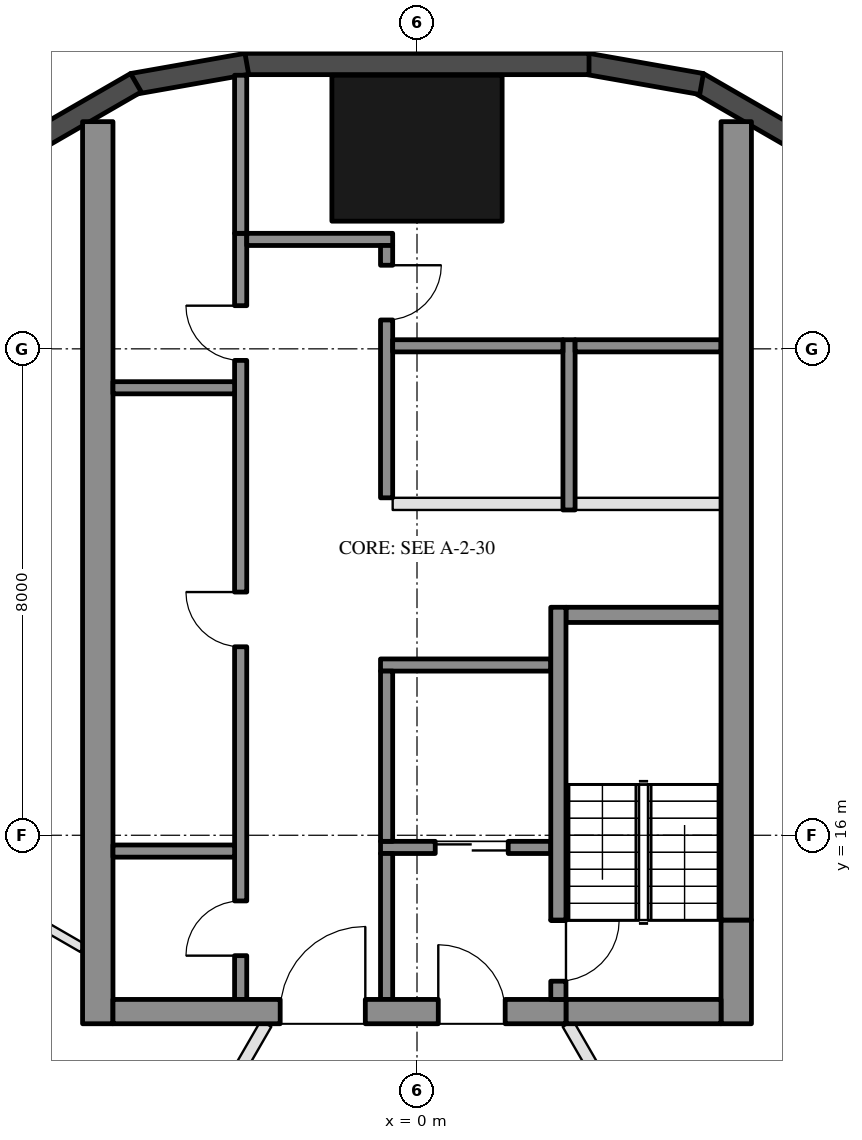
"""IFC4 building model, lengths in metres.
Left out: names, types, materials, properties, quantities, classifications, styles, units other than length and angle.
Written with IfcOpenShell. Run it as: python <this file> out.ifc"""

import sys

from ifc_helpers import new_model, si_unit, direction, frame, frame_2d, origin, origin_2d, place, context, subcontext, project, spatial, rectangle, hollow_rectangle, extrude, element, fill, save


model = new_model("IFC4")
c1 = context("Model", 3, precision=1e-05, world=origin(), true_north=direction((0.0, 1.0)))
c2 = subcontext(c1, "Body", "Model", "MODEL_VIEW")
j1 = project(units=[si_unit("LENGTHUNIT", "METRE"), si_unit("PLANEANGLEUNIT", "RADIAN")], contexts=[c1])
p1 = place(None, origin())
s1 = spatial("IfcSite", under=j1, at=p1, CompositionType="ELEMENT")
p2 = place(p1, origin())
s2 = spatial("IfcBuilding", under=s1, at=p2, CompositionType="ELEMENT")
p3 = place(p2, frame((0.0, 0.0, 131.6)))
s3 = spatial("IfcBuildingStorey", under=s2, at=p3, CompositionType="ELEMENT", Elevation=131.6)
p4 = place(p3, frame((0.0, 27.3, 0.0), z_axis=(0.0, 0.0, 1.0), x_axis=(1.0, 0.0, 0.0)))
e1 = element("IfcColumn", 1, at=p4, inside=s3, PredefinedType="COLUMN", context=c2, shape_type="SweptSolid", body=[
    extrude(hollow_rectangle(XDim=2.8, YDim=2.4, WallThickness=0.07, at=origin_2d()), origin(), (0.0, 0.0, 1.0), 6.0),
])
for number, where, z_axis, x_axis in (
    (2, (6.277, 27.422, 0.0), (0.0, 0.0, 1.0), (-0.866, 0.5, 0.0)),
    (3, (4.68, 28.356, 0.0), (0.0, 0.0, 1.0), (-0.985, 0.174, 0.0)),
):
    element("IfcWall", number, at=place(p3, frame(where, z_axis=z_axis, x_axis=x_axis)), inside=s3, PredefinedType="SOLIDWALL", context=c2, shape_type="SweptSolid", body=[
        extrude(rectangle(XDim=1.91, YDim=0.35, at=frame_2d((0.955, 0.0))), origin(), (0.0, 0.0, 1.0), 5.7),
    ])
p5 = place(p3, frame((2.829, 28.685, 0.0), z_axis=(0.0, 0.0, 1.0), x_axis=(-1.0, 0.0, 0.0)))
e4 = element("IfcWall", 4, at=p5, inside=s3, PredefinedType="SOLIDWALL", context=c2, shape_type="SweptSolid", body=[
    extrude(rectangle(XDim=5.658, YDim=0.35, at=frame_2d((2.829, 0.0))), origin(), (0.0, 0.0, 1.0), 5.7),
])
for number, where, z_axis, x_axis in (
    (5, (-2.799, 28.688, 0.0), (0.0, 0.0, 1.0), (-0.985, -0.174, 0.0)),
    (6, (-4.623, 28.377, 0.0), (0.0, 0.0, 1.0), (-0.866, -0.5, 0.0)),
):
    element("IfcWall", number, at=place(p3, frame(where, z_axis=z_axis, x_axis=x_axis)), inside=s3, PredefinedType="SOLIDWALL", context=c2, shape_type="SweptSolid", body=[
        extrude(rectangle(XDim=1.91, YDim=0.35, at=frame_2d((0.955, 0.0))), origin(), (0.0, 0.0, 1.0), 5.7),
    ])
p6 = place(p3, frame((-5.25, 12.9, 0.0), z_axis=(0.0, 0.0, 1.0), x_axis=(0.0, 1.0, 0.0)))
e7 = element("IfcWall", 7, at=p6, inside=s3, PredefinedType="SHEAR", context=c2, shape_type="SweptSolid", body=[
    extrude(rectangle(XDim=14.837, YDim=0.5, at=frame_2d((7.418, 0.0))), origin(), (0.0, 0.0, 1.0), 5.7),
])
p7 = place(p3, frame((5.0, 19.625, 0.0), z_axis=(0.0, 0.0, 1.0), x_axis=(-1.0, 0.0, 0.0)))
e8 = element("IfcWall", 8, at=p7, inside=s3, PredefinedType="SHEAR", context=c2, shape_type="SweptSolid", body=[
    extrude(rectangle(XDim=2.55, YDim=0.25, at=frame_2d((1.275, 0.0))), origin(), (0.0, 0.0, 1.0), 5.7),
])
p8 = place(p3, frame((2.2, 18.8, 0.0), z_axis=(0.0, 0.0, 1.0), x_axis=(-1.0, 0.0, 0.0)))
e9 = element("IfcWall", 9, at=p8, inside=s3, PredefinedType="SHEAR", context=c2, shape_type="SweptSolid", body=[
    extrude(rectangle(XDim=2.8, YDim=0.2, at=frame_2d((1.4, 0.0))), origin(), (0.0, 0.0, 1.0), 5.7),
])
p9 = place(p3, frame((2.2, 15.8, 0.0), z_axis=(0.0, 0.0, 1.0), x_axis=(-1.0, 0.0, 0.0)))
e10 = element("IfcWall", 10, at=p9, inside=s3, PredefinedType="SHEAR", context=c2, shape_type="SweptSolid", body=[
    extrude(rectangle(XDim=2.8, YDim=0.2, at=frame_2d((1.4, 0.0))), origin(), (0.0, 0.0, 1.0), 5.7),
])
p10 = place(p9, frame((0.7, 0.0, 0.0)))
e11 = element("IfcOpeningElement", 11, at=p10, cuts=e10, PredefinedType="OPENING", context=c2, shape_type="SweptSolid", body=[
    extrude(rectangle(XDim=1.2, YDim=2.1, at=frame_2d((0.6, 1.05))), frame((0.0, 0.11, 0.0), z_axis=(0.0, -1.0, 0.0), x_axis=(1.0, 0.0, 0.0)), (0.0, 0.0, 1.0), 0.22),
])
p11 = place(p3, frame((-0.5, 15.9, 0.0), z_axis=(0.0, 0.0, 1.0), x_axis=(0.0, 1.0, 0.0)))
e12 = element("IfcWall", 12, at=p11, inside=s3, PredefinedType="SHEAR", context=c2, shape_type="SweptSolid", body=[
    extrude(rectangle(XDim=2.8, YDim=0.2, at=frame_2d((1.4, 0.0))), origin(), (0.0, 0.0, 1.0), 5.7),
])
p12 = place(p3, frame((-0.5, 13.3, 0.0), z_axis=(0.0, 0.0, 1.0), x_axis=(0.0, 1.0, 0.0)))
e13 = element("IfcWall", 13, at=p12, inside=s3, PredefinedType="SHEAR", context=c2, shape_type="SweptSolid", body=[
    extrude(rectangle(XDim=2.4, YDim=0.2, at=frame_2d((1.2, 0.0))), origin(), (0.0, 0.0, 1.0), 5.7),
])
p13 = place(p3, frame((-2.9, 13.3, 0.0), z_axis=(0.0, 0.0, 1.0), x_axis=(0.0, 1.0, 0.0)))
e14 = element("IfcWall", 14, at=p13, inside=s3, PredefinedType="SHEAR", context=c2, shape_type="SweptSolid", body=[
    extrude(rectangle(XDim=12.6, YDim=0.2, at=frame_2d((6.3, 0.0))), origin(), (0.0, 0.0, 1.0), 5.7),
])
p14 = place(p13, frame((0.72, 0.0, 0.0)))
e15 = element("IfcOpeningElement", 15, at=p14, cuts=e14, PredefinedType="OPENING", context=c2, shape_type="SweptSolid", body=[
    extrude(rectangle(XDim=0.9, YDim=2.1, at=frame_2d((0.45, 1.05))), frame((0.0, 0.11, 0.0), z_axis=(0.0, -1.0, 0.0), x_axis=(1.0, 0.0, 0.0)), (0.0, 0.0, 1.0), 0.22),
])
p15 = place(p13, frame((5.8, 0.0, 0.0)))
e16 = element("IfcOpeningElement", 16, at=p15, cuts=e14, PredefinedType="OPENING", context=c2, shape_type="SweptSolid", body=[
    extrude(rectangle(XDim=0.9, YDim=2.1, at=frame_2d((0.45, 1.05))), frame((0.0, 0.11, 0.0), z_axis=(0.0, -1.0, 0.0), x_axis=(1.0, 0.0, 0.0)), (0.0, 0.0, 1.0), 0.22),
])
p16 = place(p13, frame((10.51, 0.0, 0.0)))
e17 = element("IfcOpeningElement", 17, at=p16, cuts=e14, PredefinedType="OPENING", context=c2, shape_type="SweptSolid", body=[
    extrude(rectangle(XDim=0.9, YDim=2.1, at=frame_2d((0.45, 1.05))), frame((0.0, 0.11, 0.0), z_axis=(0.0, -1.0, 0.0), x_axis=(1.0, 0.0, 0.0)), (0.0, 0.0, 1.0), 0.22),
])
p17 = place(p3, frame((-0.4, 25.8, 0.0), z_axis=(0.0, 0.0, 1.0), x_axis=(-1.0, 0.0, 0.0)))
e18 = element("IfcWall", 18, at=p17, inside=s3, PredefinedType="SHEAR", context=c2, shape_type="SweptSolid", body=[
    extrude(rectangle(XDim=2.4, YDim=0.2, at=frame_2d((1.2, 0.0))), origin(), (0.0, 0.0, 1.0), 5.7),
])
p18 = place(p3, frame((-0.5, 21.55, 0.0), z_axis=(0.0, 0.0, 1.0), x_axis=(0.0, 1.0, 0.0)))
e19 = element("IfcWall", 19, at=p18, inside=s3, PredefinedType="SHEAR", context=c2, shape_type="SweptSolid", body=[
    extrude(rectangle(XDim=4.15, YDim=0.2, at=frame_2d((2.075, 0.0))), origin(), (0.0, 0.0, 1.0), 5.7),
])
p19 = place(p18, frame((2.925, 0.0, 0.0)))
e20 = element("IfcOpeningElement", 20, at=p19, cuts=e19, PredefinedType="OPENING", context=c2, shape_type="SweptSolid", body=[
    extrude(rectangle(XDim=0.9, YDim=2.1, at=frame_2d((0.45, 1.05))), frame((0.0, 0.11, 0.0), z_axis=(0.0, -1.0, 0.0), x_axis=(1.0, 0.0, 0.0)), (0.0, 0.0, 1.0), 0.22),
])
for number, where, z_axis, x_axis in (
    (21, (-3.0, 15.74, 0.0), (0.0, 0.0, 1.0), (-1.0, 0.0, 0.0)),
    (22, (-3.0, 23.36, 0.0), (0.0, 0.0, 1.0), (-1.0, 0.0, 0.0)),
):
    element("IfcWall", number, at=place(p3, frame(where, z_axis=z_axis, x_axis=x_axis)), inside=s3, PredefinedType="SHEAR", context=c2, shape_type="SweptSolid", body=[
        extrude(rectangle(XDim=2.0, YDim=0.2, at=frame_2d((1.0, 0.0))), origin(), (0.0, 0.0, 1.0), 5.7),
    ])
p20 = place(p3, frame((-2.9, 25.9, 0.0), z_axis=(0.0, 0.0, 1.0), x_axis=(0.0, 1.0, 0.0)))
e23 = element("IfcWall", 23, at=p20, inside=s3, PredefinedType="SHEAR", context=c2, shape_type="SweptSolid", body=[
    extrude(rectangle(XDim=2.6, YDim=0.2, at=frame_2d((1.3, 0.0))), origin(), (0.0, 0.0, 1.0), 5.7),
])
p21 = place(p3, frame((2.5, 21.35, 0.0), z_axis=(0.0, 0.0, 1.0), x_axis=(0.0, 1.0, 0.0)))
e24 = element("IfcWall", 24, at=p21, inside=s3, PredefinedType="SHEAR", context=c2, shape_type="SweptSolid", body=[
    extrude(rectangle(XDim=2.8, YDim=0.2, at=frame_2d((1.4, 0.0))), origin(), (0.0, 0.0, 1.0), 5.7),
])
p22 = place(p3, frame((5.0, 24.05, 0.0), z_axis=(0.0, 0.0, 1.0), x_axis=(-1.0, 0.0, 0.0)))
e25 = element("IfcWall", 25, at=p22, inside=s3, PredefinedType="SHEAR", context=c2, shape_type="SweptSolid", body=[
    extrude(rectangle(XDim=2.4, YDim=0.2, at=frame_2d((1.2, 0.0))), origin(), (0.0, 0.0, 1.0), 5.7),
])
p23 = place(p3, frame((2.4, 24.05, 0.0), z_axis=(0.0, 0.0, 1.0), x_axis=(-1.0, 0.0, 0.0)))
e26 = element("IfcWall", 26, at=p23, inside=s3, PredefinedType="SHEAR", context=c2, shape_type="SweptSolid", body=[
    extrude(rectangle(XDim=2.8, YDim=0.2, at=frame_2d((1.4, 0.0))), origin(), (0.0, 0.0, 1.0), 5.7),
])
p24 = place(p3, frame((5.0, 21.45, 0.0), z_axis=(0.0, 0.0, 1.0), x_axis=(-1.0, 0.0, 0.0)))
e27 = element("IfcWall", 27, at=p24, inside=s3, PredefinedType="PARTITIONING", context=c2, shape_type="SweptSolid", body=[
    extrude(rectangle(XDim=2.4, YDim=0.2, at=frame_2d((1.2, 0.0))), origin(), (0.0, 0.0, 1.0), 5.7),
])
p25 = place(p3, frame((2.4, 21.45, 0.0), z_axis=(0.0, 0.0, 1.0), x_axis=(-1.0, 0.0, 0.0)))
e28 = element("IfcWall", 28, at=p25, inside=s3, PredefinedType="PARTITIONING", context=c2, shape_type="SweptSolid", body=[
    extrude(rectangle(XDim=2.8, YDim=0.2, at=frame_2d((1.4, 0.0))), origin(), (0.0, 0.0, 1.0), 5.7),
])
p26 = place(p3, frame((5.25, 12.9, 0.0), z_axis=(0.0, 0.0, 1.0), x_axis=(0.0, 1.0, 0.0)))
e29 = element("IfcWall", 29, at=p26, inside=s3, PredefinedType="SHEAR", context=c2, shape_type="SweptSolid", body=[
    extrude(rectangle(XDim=1.706, YDim=0.5, at=frame_2d((0.853, 0.0))), origin(), (0.0, 0.0, 1.0), 5.7),
])
p27 = place(p3, frame((5.25, 14.606, 0.0), z_axis=(0.0, 0.0, 1.0), x_axis=(0.0, 1.0, 0.0)))
e30 = element("IfcWall", 30, at=p27, inside=s3, PredefinedType="SHEAR", context=c2, shape_type="SweptSolid", body=[
    extrude(rectangle(XDim=13.131, YDim=0.5, at=frame_2d((6.565, 0.0))), origin(), (0.0, 0.0, 1.0), 5.7),
])
p28 = place(p3, frame((5.0, 13.1, 0.0), z_axis=(0.0, 0.0, 1.0), x_axis=(-1.0, 0.0, 0.0)))
e31 = element("IfcWall", 31, at=p28, inside=s3, PredefinedType="SHEAR", context=c2, shape_type="SweptSolid", body=[
    extrude(rectangle(XDim=2.55, YDim=0.4, at=frame_2d((1.275, 0.0))), origin(), (0.0, 0.0, 1.0), 5.7),
])
p29 = place(p3, frame((2.45, 13.1, 0.0), z_axis=(0.0, 0.0, 1.0), x_axis=(-1.0, 0.0, 0.0)))
e32 = element("IfcWall", 32, at=p29, inside=s3, PredefinedType="SHEAR", context=c2, shape_type="SweptSolid", body=[
    extrude(rectangle(XDim=7.45, YDim=0.4, at=frame_2d((3.725, 0.0))), origin(), (0.0, 0.0, 1.0), 5.7),
])
p30 = place(p29, frame((1.0, 0.0, 0.0)))
e33 = element("IfcOpeningElement", 33, at=p30, cuts=e32, PredefinedType="OPENING", context=c2, shape_type="SweptSolid", body=[
    extrude(rectangle(XDim=1.1, YDim=2.1, at=frame_2d((0.55, 1.05))), frame((0.0, 0.21, 0.0), z_axis=(0.0, -1.0, 0.0), x_axis=(1.0, 0.0, 0.0)), (0.0, 0.0, 1.0), 0.42),
])
p31 = place(p29, frame((3.3, 0.0, 0.0)))
e34 = element("IfcOpeningElement", 34, at=p31, cuts=e32, PredefinedType="OPENING", context=c2, shape_type="SweptSolid", body=[
    extrude(rectangle(XDim=1.4, YDim=2.1, at=frame_2d((0.7, 1.05))), frame((0.0, 0.21, 0.0), z_axis=(0.0, -1.0, 0.0), x_axis=(1.0, 0.0, 0.0)), (0.0, 0.0, 1.0), 0.42),
])
p32 = place(p3, frame((2.325, 13.3, 0.0), z_axis=(0.0, 0.0, 1.0), x_axis=(0.0, 1.0, 0.0)))
e35 = element("IfcWall", 35, at=p32, inside=s3, PredefinedType="SHEAR", context=c2, shape_type="SweptSolid", body=[
    extrude(rectangle(XDim=1.306, YDim=0.25, at=frame_2d((0.653, 0.0))), origin(), (0.0, 0.0, 1.0), 5.7),
])
p33 = place(p32, frame((0.3, 0.0, 0.0)))
e36 = element("IfcOpeningElement", 36, at=p33, cuts=e35, PredefinedType="OPENING", context=c2, shape_type="SweptSolid", body=[
    extrude(rectangle(XDim=1.0, YDim=2.1, at=frame_2d((0.5, 1.05))), frame((0.0, 0.135, 0.0), z_axis=(0.0, -1.0, 0.0), x_axis=(1.0, 0.0, 0.0)), (0.0, 0.0, 1.0), 0.27),
])
p34 = place(p3, frame((2.325, 14.606, 0.0), z_axis=(0.0, 0.0, 1.0), x_axis=(0.0, 1.0, 0.0)))
e37 = element("IfcWall", 37, at=p34, inside=s3, PredefinedType="SHEAR", context=c2, shape_type="SweptSolid", body=[
    extrude(rectangle(XDim=5.144, YDim=0.25, at=frame_2d((2.572, 0.0))), origin(), (0.0, 0.0, 1.0), 5.7),
])
p35 = place(p3, frame((12.413, -4.3, 0.0), z_axis=(0.0, 0.0, 1.0), x_axis=(-0.50000478328, 0.866022642139, 0.0)))
e38 = element("IfcWall", 38, at=p35, inside=s3, PredefinedType="PARTITIONING", context=c2, shape_type="SweptSolid", body=[
    extrude(rectangle(XDim=19.861, YDim=0.2, at=frame_2d((9.931, 0.0))), origin(), (0.0, 0.0, 1.0), 4.91),
])
p36 = place(p35, frame((1.142, 0.0, 0.0)))
e39 = element("IfcOpeningElement", 39, at=p36, cuts=e38, PredefinedType="OPENING", context=c2, shape_type="SweptSolid", body=[
    extrude(rectangle(XDim=1.8, YDim=2.4, at=frame_2d((0.9, 1.2))), frame((0.0, 0.11, 0.0), z_axis=(0.0, -1.0, 0.0), x_axis=(1.0, 0.0, 0.0)), (0.0, 0.0, 1.0), 0.22),
])
p37 = place(p35, frame((4.325, 0.0, 0.0)))
e40 = element("IfcOpeningElement", 40, at=p37, cuts=e38, PredefinedType="OPENING", context=c2, shape_type="SweptSolid", body=[
    extrude(rectangle(XDim=1.8, YDim=2.4, at=frame_2d((0.9, 1.2))), frame((0.0, 0.11, 0.0), z_axis=(0.0, -1.0, 0.0), x_axis=(1.0, 0.0, 0.0)), (0.0, 0.0, 1.0), 0.22),
])
p38 = place(p35, frame((8.355, 0.0, 0.0)))
e41 = element("IfcOpeningElement", 41, at=p38, cuts=e38, PredefinedType="OPENING", context=c2, shape_type="SweptSolid", body=[
    extrude(rectangle(XDim=1.2, YDim=2.1, at=frame_2d((0.6, 1.05))), frame((0.0, 0.11, 0.0), z_axis=(0.0, -1.0, 0.0), x_axis=(1.0, 0.0, 0.0)), (0.0, 0.0, 1.0), 0.22),
])
p39 = place(p35, frame((12.573, 0.0, 0.0)))
e42 = element("IfcOpeningElement", 42, at=p39, cuts=e38, PredefinedType="OPENING", context=c2, shape_type="SweptSolid", body=[
    extrude(rectangle(XDim=1.2, YDim=2.1, at=frame_2d((0.6, 1.05))), frame((0.0, 0.11, 0.0), z_axis=(0.0, -1.0, 0.0), x_axis=(1.0, 0.0, 0.0)), (0.0, 0.0, 1.0), 0.22),
])
p40 = place(p35, frame((17.032, 0.0, 0.0)))
e43 = element("IfcOpeningElement", 43, at=p40, cuts=e38, PredefinedType="OPENING", context=c2, shape_type="SweptSolid", body=[
    extrude(rectangle(XDim=1.2, YDim=2.1, at=frame_2d((0.6, 1.05))), frame((0.0, 0.11, 0.0), z_axis=(0.0, -1.0, 0.0), x_axis=(1.0, 0.0, 0.0)), (0.0, 0.0, 1.0), 0.22),
])
p41 = place(p3, frame((-12.077, 17.942, 0.0), z_axis=(0.0, 0.0, 1.0), x_axis=(0.866028729371, -0.499994239872, 0.0)))
e44 = element("IfcWall", 44, at=p41, inside=s3, PredefinedType="PARTITIONING", context=c2, shape_type="SweptSolid", body=[
    extrude(rectangle(XDim=7.594, YDim=0.15, at=frame_2d((3.797, 0.0))), origin(), (0.0, 0.0, 1.0), 5.7),
])
p42 = place(p41, frame((3.347, 0.0, 0.0)))
e45 = element("IfcOpeningElement", 45, at=p42, cuts=e44, PredefinedType="OPENING", context=c2, shape_type="SweptSolid", body=[
    extrude(rectangle(XDim=0.9, YDim=2.1, at=frame_2d((0.45, 1.05))), frame((0.0, 0.085, 0.0), z_axis=(0.0, -1.0, 0.0), x_axis=(1.0, 0.0, 0.0)), (0.0, 0.0, 1.0), 0.17),
])
p43 = place(p3, frame((-15.077, 12.746, 0.0), z_axis=(0.0, 0.0, 1.0), x_axis=(0.866026447599, -0.499998192055, 0.0)))
e46 = element("IfcWall", 46, at=p43, inside=s3, PredefinedType="PARTITIONING", context=c2, shape_type="SweptSolid", body=[
    extrude(rectangle(XDim=10.73, YDim=0.15, at=frame_2d((5.365, 0.0))), origin(), (0.0, 0.0, 1.0), 5.7),
])
p44 = place(p3, frame((-2.482, 12.9, 0.0), z_axis=(0.0, 0.0, 1.0), x_axis=(-0.50000478328, -0.866022642139, 0.0)))
e47 = element("IfcWall", 47, at=p44, inside=s3, PredefinedType="PARTITIONING", context=c2, shape_type="SweptSolid", body=[
    extrude(rectangle(XDim=19.861, YDim=0.2, at=frame_2d((9.931, 0.0))), origin(), (0.0, 0.0, 1.0), 4.91),
])
p45 = place(p44, frame((2.643, 0.0, 0.0)))
e48 = element("IfcOpeningElement", 48, at=p45, cuts=e47, PredefinedType="OPENING", context=c2, shape_type="SweptSolid", body=[
    extrude(rectangle(XDim=1.5, YDim=2.1, at=frame_2d((0.75, 1.05))), frame((0.0, 0.11, 0.0), z_axis=(0.0, -1.0, 0.0), x_axis=(1.0, 0.0, 0.0)), (0.0, 0.0, 1.0), 0.22),
])
p46 = place(p44, frame((14.261, 0.0, 0.0)))
e49 = element("IfcOpeningElement", 49, at=p46, cuts=e47, PredefinedType="OPENING", context=c2, shape_type="SweptSolid", body=[
    extrude(rectangle(XDim=1.5, YDim=2.1, at=frame_2d((0.75, 1.05))), frame((0.0, 0.11, 0.0), z_axis=(0.0, -1.0, 0.0), x_axis=(1.0, 0.0, 0.0)), (0.0, 0.0, 1.0), 0.22),
])
p47 = place(p44, frame((17.394, 0.0, 0.0)))
e50 = element("IfcOpeningElement", 50, at=p47, cuts=e47, PredefinedType="OPENING", context=c2, shape_type="SweptSolid", body=[
    extrude(rectangle(XDim=1.5, YDim=2.1, at=frame_2d((0.75, 1.05))), frame((0.0, 0.11, 0.0), z_axis=(0.0, -1.0, 0.0), x_axis=(1.0, 0.0, 0.0)), (0.0, 0.0, 1.0), 0.22),
])
p48 = place(p44, frame((9.43, 0.0, 0.0)))
e51 = element("IfcOpeningElement", 51, at=p48, cuts=e47, PredefinedType="OPENING", context=c2, shape_type="SweptSolid", body=[
    extrude(rectangle(XDim=1.0, YDim=2.1, at=frame_2d((0.5, 1.05))), frame((0.0, 0.11, 0.0), z_axis=(0.0, -1.0, 0.0), x_axis=(1.0, 0.0, 0.0)), (0.0, 0.0, 1.0), 0.22),
])
p49 = place(p10, origin())
e52 = element("IfcDoor", 52, at=p49, inside=s3, OperationType="DOUBLE_DOOR_SLIDING", PredefinedType="DOOR", context=c2, shape_type="SweptSolid", body=[
    extrude(rectangle(XDim=1.2, YDim=2.1, at=frame_2d((0.6, 1.05))), frame((0.0, 0.025, 0.0), z_axis=(0.0, -1.0, 0.0), x_axis=(1.0, 0.0, 0.0)), (0.0, 0.0, 1.0), 0.05),
])
fill(e11, e52)
p50 = place(p14, origin())
e53 = element("IfcDoor", 53, at=p50, inside=s3, OperationType="SINGLE_SWING_LEFT", PredefinedType="DOOR", context=c2, shape_type="SweptSolid", body=[
    extrude(rectangle(XDim=0.9, YDim=2.1, at=frame_2d((0.45, 1.05))), frame((0.0, 0.025, 0.0), z_axis=(0.0, -1.0, 0.0), x_axis=(1.0, 0.0, 0.0)), (0.0, 0.0, 1.0), 0.05),
])
fill(e15, e53)
p51 = place(p15, origin())
e54 = element("IfcDoor", 54, at=p51, inside=s3, OperationType="SINGLE_SWING_RIGHT", PredefinedType="DOOR", context=c2, shape_type="SweptSolid", body=[
    extrude(rectangle(XDim=0.9, YDim=2.1, at=frame_2d((0.45, 1.05))), frame((0.0, 0.025, 0.0), z_axis=(0.0, -1.0, 0.0), x_axis=(1.0, 0.0, 0.0)), (0.0, 0.0, 1.0), 0.05),
])
fill(e16, e54)
p52 = place(p16, origin())
e55 = element("IfcDoor", 55, at=p52, inside=s3, OperationType="SINGLE_SWING_RIGHT", PredefinedType="DOOR", context=c2, shape_type="SweptSolid", body=[
    extrude(rectangle(XDim=0.9, YDim=2.1, at=frame_2d((0.45, 1.05))), frame((0.0, 0.025, 0.0), z_axis=(0.0, -1.0, 0.0), x_axis=(1.0, 0.0, 0.0)), (0.0, 0.0, 1.0), 0.05),
])
fill(e17, e55)
p53 = place(p19, frame((0.9, 0.0, 0.0), z_axis=(0.0, 0.0, 1.0), x_axis=(-1.0, 0.0, 0.0)))
e56 = element("IfcDoor", 56, at=p53, inside=s3, OperationType="SINGLE_SWING_LEFT", PredefinedType="DOOR", context=c2, shape_type="SweptSolid", body=[
    extrude(rectangle(XDim=0.9, YDim=2.1, at=frame_2d((0.45, 1.05))), frame((0.0, 0.025, 0.0), z_axis=(0.0, -1.0, 0.0), x_axis=(1.0, 0.0, 0.0)), (0.0, 0.0, 1.0), 0.05),
])
fill(e20, e56)
p54 = place(p30, frame((1.1, 0.0, 0.0), z_axis=(0.0, 0.0, 1.0), x_axis=(-1.0, 0.0, 0.0)))
e57 = element("IfcDoor", 57, at=p54, inside=s3, OperationType="SINGLE_SWING_LEFT", PredefinedType="DOOR", context=c2, shape_type="SweptSolid", body=[
    extrude(rectangle(XDim=1.1, YDim=2.1, at=frame_2d((0.55, 1.05))), frame((0.0, 0.025, 0.0), z_axis=(0.0, -1.0, 0.0), x_axis=(1.0, 0.0, 0.0)), (0.0, 0.0, 1.0), 0.05),
])
fill(e33, e57)
p55 = place(p31, frame((1.4, 0.0, 0.0), z_axis=(0.0, 0.0, 1.0), x_axis=(-1.0, 0.0, 0.0)))
e58 = element("IfcDoor", 58, at=p55, inside=s3, OperationType="DOUBLE_DOOR_SINGLE_SWING", PredefinedType="DOOR", context=c2, shape_type="SweptSolid", body=[
    extrude(rectangle(XDim=1.4, YDim=2.1, at=frame_2d((0.7, 1.05))), frame((0.0, 0.025, 0.0), z_axis=(0.0, -1.0, 0.0), x_axis=(1.0, 0.0, 0.0)), (0.0, 0.0, 1.0), 0.05),
])
fill(e34, e58)
p56 = place(p33, frame((1.0, 0.0, 0.0), z_axis=(0.0, 0.0, 1.0), x_axis=(-1.0, 0.0, 0.0)))
e59 = element("IfcDoor", 59, at=p56, inside=s3, OperationType="SINGLE_SWING_LEFT", PredefinedType="DOOR", context=c2, shape_type="SweptSolid", body=[
    extrude(rectangle(XDim=1.0, YDim=2.1, at=frame_2d((0.5, 1.05))), frame((0.0, 0.025, 0.0), z_axis=(0.0, -1.0, 0.0), x_axis=(1.0, 0.0, 0.0)), (0.0, 0.0, 1.0), 0.05),
])
fill(e36, e59)
save(model, sys.argv[1])
